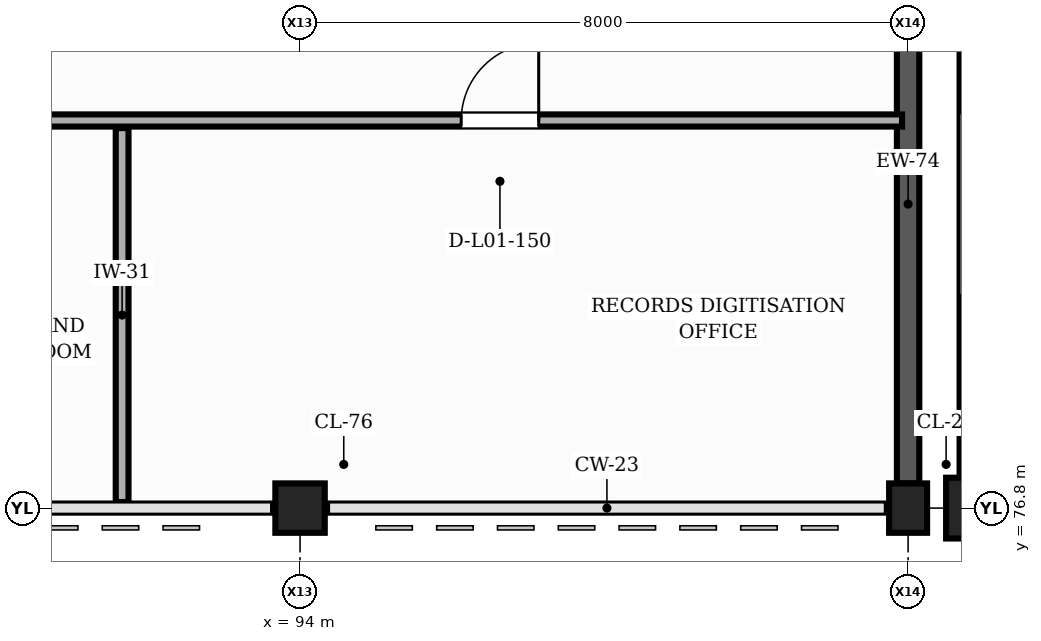
"""IFC4 building model, lengths in metres.
Left out: names, types, materials, properties, quantities, classifications, styles, units other than length and angle.
Written with IfcOpenShell. Run it as: python <this file> out.ifc"""

import sys

from ifc_helpers import new_model, si_unit, direction, frame, frame_2d, origin, origin_2d, place, context, subcontext, project, spatial, rectangle, extrude, element, fill, save


model = new_model("IFC4")
c1 = context("Model", 3, precision=1e-05, world=origin(), true_north=direction((0.0, 1.0)))
c2 = subcontext(c1, "Body", "Model", "MODEL_VIEW")
j1 = project(units=[si_unit("LENGTHUNIT", "METRE"), si_unit("PLANEANGLEUNIT", "RADIAN")], contexts=[c1])
p1 = place(None, origin())
s1 = spatial("IfcSite", under=j1, at=p1, CompositionType="ELEMENT")
p2 = place(p1, origin())
s2 = spatial("IfcBuilding", under=s1, at=p2, CompositionType="ELEMENT")
p3 = place(p2, frame((0.0, 0.0, 4.8)))
s3 = spatial("IfcBuildingStorey", under=s2, at=p3, CompositionType="ELEMENT", Elevation=4.8)
p4 = place(p3, frame((94.0, 76.8, 0.0), z_axis=(0.0, 0.0, 1.0), x_axis=(1.0, 0.0, 0.0)))
e1 = element("IfcColumn", 1, at=p4, inside=s3, PredefinedType="COLUMN", context=c2, shape_type="SweptSolid", body=[
    extrude(rectangle(XDim=0.65, YDim=0.65, at=origin_2d()), origin(), (0.0, 0.0, 1.0), 4.2),
])
p5 = place(p3, frame((102.0, 76.8, 0.0), z_axis=(0.0, 0.0, 1.0), x_axis=(1.0, 0.0, 0.0)))
e2 = element("IfcColumn", 2, at=p5, inside=s3, PredefinedType="COLUMN", context=c2, shape_type="SweptSolid", body=[
    extrude(rectangle(XDim=0.5, YDim=0.65, at=origin_2d()), origin(), (0.0, 0.0, 1.0), 4.2),
])
p6 = place(p3, frame((102.8, 76.8, 0.0), z_axis=(0.0, 0.0, 1.0), x_axis=(1.0, 0.0, 0.0)))
e3 = element("IfcColumn", 3, at=p6, inside=s3, PredefinedType="COLUMN", context=c2, shape_type="SweptSolid", body=[
    extrude(rectangle(XDim=0.6, YDim=0.8, at=origin_2d()), origin(), (0.0, 0.0, 1.0), 4.2),
])
p7 = place(p3, frame((102.0, 77.125, 0.0), z_axis=(0.0, 0.0, 1.0), x_axis=(0.0, 1.0, 0.0)))
e4 = element("IfcWall", 4, at=p7, inside=s3, PredefinedType="SOLIDWALL", context=c2, shape_type="SweptSolid", body=[
    extrude(rectangle(XDim=7.35, YDim=0.295, at=frame_2d((3.675, 0.0))), origin(), (0.0, 0.0, 1.0), 3.26),
])
p8 = place(p3, frame((102.8, 84.4, 0.0), z_axis=(0.0, 0.0, 1.0), x_axis=(0.0, -1.0, 0.0)))
e5 = element("IfcWall", 5, at=p8, inside=s3, PredefinedType="SOLIDWALL", context=c2, shape_type="SweptSolid", body=[
    extrude(rectangle(XDim=7.2, YDim=0.245, at=frame_2d((3.6, 0.0))), origin(), (0.0, 0.0, 1.0), 3.26),
])
p9 = place(p8, frame((2.4, 0.0, 0.9)))
e6 = element("IfcOpeningElement", 6, at=p9, cuts=e5, PredefinedType="OPENING", context=c2, shape_type="SweptSolid", body=[
    extrude(rectangle(XDim=2.4, YDim=1.5, at=frame_2d((1.2, 0.75))), frame((0.0, 0.133, 0.0), z_axis=(0.0, -1.0, 0.0), x_axis=(1.0, 0.0, 0.0)), (0.0, 0.0, 1.0), 0.265),
])
p10 = place(p3, frame((91.659, 76.88, 0.0), z_axis=(0.0, 0.0, 1.0), x_axis=(0.0, 1.0, 0.0)))
e7 = element("IfcWall", 7, at=p10, inside=s3, PredefinedType="PARTITIONING", context=c2, shape_type="SweptSolid", body=[
    extrude(rectangle(XDim=4.92, YDim=0.168, at=frame_2d((2.46, 0.0))), origin(), (0.0, 0.0, 1.0), 3.145),
])
p11 = place(p3, frame((29.3, 81.9, 0.0), z_axis=(0.0, 0.0, 1.0), x_axis=(1.0, 0.0, 0.0)))
e8 = element("IfcWall", 8, at=p11, inside=s3, PredefinedType="PARTITIONING", context=c2, shape_type="SweptSolid", body=[
    extrude(rectangle(XDim=72.62, YDim=0.16, at=frame_2d((36.31, 0.0))), origin(), (0.0, 0.0, 1.0), 3.195),
])
p12 = place(p11, frame((7.49, 0.0, 0.0)))
e9 = element("IfcOpeningElement", 9, at=p12, cuts=e8, PredefinedType="OPENING", context=c2, shape_type="SweptSolid", body=[
    extrude(rectangle(XDim=0.9, YDim=2.1, at=frame_2d((0.45, 1.05))), frame((0.0, 0.09, 0.0), z_axis=(0.0, -1.0, 0.0), x_axis=(1.0, 0.0, 0.0)), (0.0, 0.0, 1.0), 0.18),
])
p13 = place(p11, frame((22.09, 0.0, 0.0)))
e10 = element("IfcOpeningElement", 10, at=p13, cuts=e8, PredefinedType="OPENING", context=c2, shape_type="SweptSolid", body=[
    extrude(rectangle(XDim=0.92, YDim=2.1, at=frame_2d((0.46, 1.05))), frame((0.0, 0.09, 0.0), z_axis=(0.0, -1.0, 0.0), x_axis=(1.0, 0.0, 0.0)), (0.0, 0.0, 1.0), 0.18),
])
p14 = place(p11, frame((34.65, 0.0, 0.0)))
e11 = element("IfcOpeningElement", 11, at=p14, cuts=e8, PredefinedType="OPENING", context=c2, shape_type="SweptSolid", body=[
    extrude(rectangle(XDim=0.95, YDim=2.1, at=frame_2d((0.475, 1.05))), frame((0.0, 0.09, 0.0), z_axis=(0.0, -1.0, 0.0), x_axis=(1.0, 0.0, 0.0)), (0.0, 0.0, 1.0), 0.18),
])
p15 = place(p11, frame((46.19, 0.0, 0.0)))
e12 = element("IfcOpeningElement", 12, at=p15, cuts=e8, PredefinedType="OPENING", context=c2, shape_type="SweptSolid", body=[
    extrude(rectangle(XDim=0.98, YDim=2.12, at=frame_2d((0.49, 1.06))), frame((0.0, 0.09, 0.0), z_axis=(0.0, -1.0, 0.0), x_axis=(1.0, 0.0, 0.0)), (0.0, 0.0, 1.0), 0.18),
])
p16 = place(p11, frame((56.74, 0.0, 0.0)))
e13 = element("IfcOpeningElement", 13, at=p16, cuts=e8, PredefinedType="OPENING", context=c2, shape_type="SweptSolid", body=[
    extrude(rectangle(XDim=1.0, YDim=2.1, at=frame_2d((0.5, 1.05))), frame((0.0, 0.09, 0.0), z_axis=(0.0, -1.0, 0.0), x_axis=(1.0, 0.0, 0.0)), (0.0, 0.0, 1.0), 0.18),
])
p17 = place(p11, frame((66.82, 0.0, 0.0)))
e14 = element("IfcOpeningElement", 14, at=p17, cuts=e8, PredefinedType="OPENING", context=c2, shape_type="SweptSolid", body=[
    extrude(rectangle(XDim=1.02, YDim=2.12, at=frame_2d((0.51, 1.06))), frame((0.0, 0.09, 0.0), z_axis=(0.0, -1.0, 0.0), x_axis=(1.0, 0.0, 0.0)), (0.0, 0.0, 1.0), 0.18),
])
p18 = place(p17, origin())
e15 = element("IfcDoor", 15, at=p18, inside=s3, OperationType="SINGLE_SWING_RIGHT", PredefinedType="DOOR", context=c2, shape_type="SweptSolid", body=[
    extrude(rectangle(XDim=1.02, YDim=2.12, at=frame_2d((0.51, 1.06))), frame((0.0, 0.025, 0.0), z_axis=(0.0, -1.0, 0.0), x_axis=(1.0, 0.0, 0.0)), (0.0, 0.0, 1.0), 0.05),
])
fill(e14, e15)
save(model, sys.argv[1])
